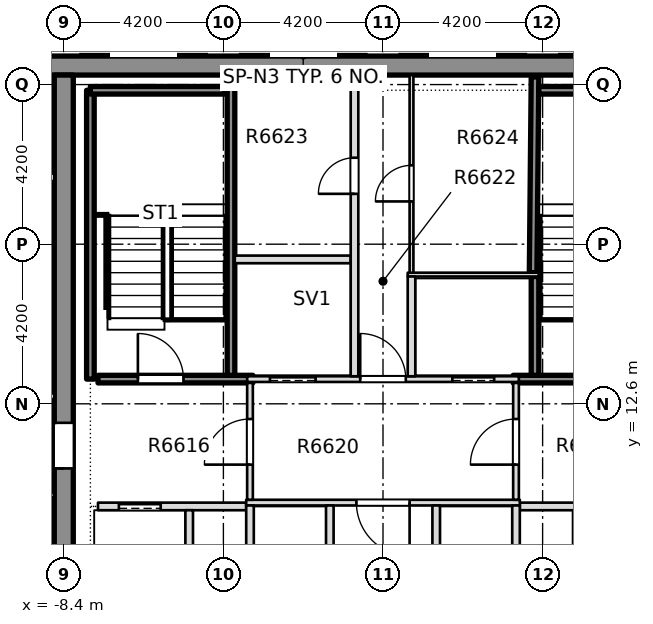
"""IFC4 building model, lengths in metres.
Left out: names, types, materials, properties, quantities, classifications, styles, units other than length and angle.
Written with IfcOpenShell. Run it as: python <this file> out.ifc"""

import sys

from ifc_helpers import new_model, si_unit, direction, frame, frame_2d, origin, place, context, subcontext, project, spatial, rectangle, extrude, element, fill, save


model = new_model("IFC4")
c1 = context("Model", 3, precision=1e-05, world=origin(), true_north=direction((0.0, 1.0)))
c2 = subcontext(c1, "Body", "Model", "MODEL_VIEW")
j1 = project(units=[si_unit("LENGTHUNIT", "METRE"), si_unit("PLANEANGLEUNIT", "RADIAN")], contexts=[c1])
p1 = place(None, origin())
s1 = spatial("IfcSite", under=j1, at=p1, CompositionType="ELEMENT")
p2 = place(p1, origin())
s2 = spatial("IfcBuilding", under=s1, at=p2, CompositionType="ELEMENT")
p3 = place(p2, frame((0.0, 0.0, 251.05)))
s3 = spatial("IfcBuildingStorey", under=s2, at=p3, CompositionType="ELEMENT", Elevation=251.05)
p4 = place(p3, frame((-12.1, 21.5, -0.4), z_axis=(0.0, 0.0, 1.0), x_axis=(1.0, 0.0, 0.0)))
e1 = element("IfcWall", 1, at=p4, inside=s3, PredefinedType="SHEAR", context=c2, shape_type="SweptSolid", body=[
    extrude(rectangle(XDim=24.2, YDim=0.5, at=frame_2d((12.1, 0.0))), origin(), (0.0, 0.0, 1.0), 3.45),
])
p5 = place(p3, frame((-8.4, -7.9, -0.4), z_axis=(0.0, 0.0, 1.0), x_axis=(0.0, 1.0, 0.0)))
e2 = element("IfcWall", 2, at=p5, inside=s3, PredefinedType="SHEAR", context=c2, shape_type="SweptSolid", body=[
    extrude(rectangle(XDim=29.15, YDim=0.5, at=frame_2d((14.575, 0.0))), origin(), (0.0, 0.0, 1.0), 3.45),
])
p6 = place(p5, frame((18.8, 0.0, 0.4)))
e3 = element("IfcOpeningElement", 3, at=p6, cuts=e2, PredefinedType="OPENING", context=c2, shape_type="SweptSolid", body=[
    extrude(rectangle(XDim=1.2, YDim=2.1, at=frame_2d((0.6, 1.05))), frame((0.0, 0.26, 0.0), z_axis=(0.0, -1.0, 0.0), x_axis=(1.0, 0.0, 0.0)), (0.0, 0.0, 1.0), 0.52),
])
p7 = place(p3, frame((-7.5, 9.9, 0.0), z_axis=(0.0, 0.0, 1.0), x_axis=(1.0, 0.0, 0.0)))
e4 = element("IfcWall", 4, at=p7, inside=s3, PredefinedType="PARTITIONING", context=c2, shape_type="SweptSolid", body=[
    extrude(rectangle(XDim=3.9, YDim=0.2, at=frame_2d((1.95, 0.0))), origin(), (0.0, 0.0, 1.0), 3.05),
])
p8 = place(p7, frame((0.55, 0.0, 0.0)))
e5 = element("IfcOpeningElement", 5, at=p8, cuts=e4, PredefinedType="OPENING", context=c2, shape_type="SweptSolid", body=[
    extrude(rectangle(XDim=1.1, YDim=2.1, at=frame_2d((0.55, 1.05))), frame((0.0, 0.11, 0.0), z_axis=(0.0, -1.0, 0.0), x_axis=(1.0, 0.0, 0.0)), (0.0, 0.0, 1.0), 0.22),
])
p9 = place(p3, frame((3.6, 9.9, 0.0), z_axis=(0.0, 0.0, 1.0), x_axis=(1.0, 0.0, 0.0)))
e6 = element("IfcWall", 6, at=p9, inside=s3, PredefinedType="PARTITIONING", context=c2, shape_type="SweptSolid", body=[
    extrude(rectangle(XDim=3.9, YDim=0.2, at=frame_2d((1.95, 0.0))), origin(), (0.0, 0.0, 1.0), 3.05),
])
p10 = place(p9, frame((2.25, 0.0, 0.0)))
e7 = element("IfcOpeningElement", 7, at=p10, cuts=e6, PredefinedType="OPENING", context=c2, shape_type="SweptSolid", body=[
    extrude(rectangle(XDim=1.1, YDim=2.1, at=frame_2d((0.55, 1.05))), frame((0.0, 0.11, 0.0), z_axis=(0.0, -1.0, 0.0), x_axis=(1.0, 0.0, 0.0)), (0.0, 0.0, 1.0), 0.22),
])
p11 = place(p3, frame((-3.6, 10.0, 0.0), z_axis=(0.0, 0.0, 1.0), x_axis=(1.0, 0.0, 0.0)))
e8 = element("IfcWall", 8, at=p11, inside=s3, PredefinedType="PARTITIONING", context=c2, shape_type="SweptSolid", body=[
    extrude(rectangle(XDim=7.2, YDim=0.15, at=frame_2d((3.6, 0.0))), origin(), (0.0, 0.0, 1.0), 3.05),
])
p12 = place(p11, frame((2.9, 0.0, 0.0)))
e9 = element("IfcOpeningElement", 9, at=p12, cuts=e8, PredefinedType="OPENING", context=c2, shape_type="SweptSolid", body=[
    extrude(rectangle(XDim=1.4, YDim=2.1, at=frame_2d((0.7, 1.05))), frame((0.0, 0.085, 0.0), z_axis=(0.0, -1.0, 0.0), x_axis=(1.0, 0.0, 0.0)), (0.0, 0.0, 1.0), 0.17),
])
p13 = place(p3, frame((-7.5, 13.25, 0.0), z_axis=(0.0, 0.0, 1.0), x_axis=(1.0, 0.0, 0.0)))
e10 = element("IfcWall", 10, at=p13, inside=s3, PredefinedType="SOLIDWALL", context=c2, shape_type="SweptSolid", body=[
    extrude(rectangle(XDim=4.075, YDim=0.2, at=frame_2d((2.038, 0.0))), origin(), (0.0, 0.0, 1.0), 3.05),
])
p14 = place(p13, frame((1.05, 0.0, 0.0)))
e11 = element("IfcOpeningElement", 11, at=p14, cuts=e10, PredefinedType="OPENING", context=c2, shape_type="SweptSolid", body=[
    extrude(rectangle(XDim=1.2, YDim=2.1, at=frame_2d((0.6, 1.05))), frame((0.0, 0.11, 0.0), z_axis=(0.0, -1.0, 0.0), x_axis=(1.0, 0.0, 0.0)), (0.0, 0.0, 1.0), 0.22),
])
p15 = place(p3, frame((-3.575, 13.25, 0.0), z_axis=(0.0, 0.0, 1.0), x_axis=(1.0, 0.0, 0.0)))
e12 = element("IfcWall", 12, at=p15, inside=s3, PredefinedType="PARTITIONING", context=c2, shape_type="SweptSolid", body=[
    extrude(rectangle(XDim=7.15, YDim=0.15, at=frame_2d((3.575, 0.0))), origin(), (0.0, 0.0, 1.0), 3.05),
])
p16 = place(p15, frame((0.6, 0.0, 0.0)))
e13 = element("IfcOpeningElement", 13, at=p16, cuts=e12, PredefinedType="OPENING", context=c2, shape_type="SweptSolid", body=[
    extrude(rectangle(XDim=1.2, YDim=2.1, at=frame_2d((0.6, 1.05))), frame((0.0, 0.085, 0.0), z_axis=(0.0, -1.0, 0.0), x_axis=(1.0, 0.0, 0.0)), (0.0, 0.0, 1.0), 0.17),
])
p17 = place(p15, frame((5.4, 0.0, 0.0)))
e14 = element("IfcOpeningElement", 14, at=p17, cuts=e12, PredefinedType="OPENING", context=c2, shape_type="SweptSolid", body=[
    extrude(rectangle(XDim=1.1, YDim=2.1, at=frame_2d((0.55, 1.05))), frame((0.0, 0.085, 0.0), z_axis=(0.0, -1.0, 0.0), x_axis=(1.0, 0.0, 0.0)), (0.0, 0.0, 1.0), 0.17),
])
p18 = place(p15, frame((2.975, 0.0, 0.0)))
e15 = element("IfcOpeningElement", 15, at=p18, cuts=e12, PredefinedType="OPENING", context=c2, shape_type="SweptSolid", body=[
    extrude(rectangle(XDim=1.2, YDim=2.1, at=frame_2d((0.6, 1.05))), frame((0.0, 0.085, 0.0), z_axis=(0.0, -1.0, 0.0), x_axis=(1.0, 0.0, 0.0)), (0.0, 0.0, 1.0), 0.17),
])
p19 = place(p3, frame((3.425, 13.25, 0.0), z_axis=(0.0, 0.0, 1.0), x_axis=(1.0, 0.0, 0.0)))
e16 = element("IfcWall", 16, at=p19, inside=s3, PredefinedType="SOLIDWALL", context=c2, shape_type="SweptSolid", body=[
    extrude(rectangle(XDim=4.075, YDim=0.2, at=frame_2d((2.038, 0.0))), origin(), (0.0, 0.0, 1.0), 3.05),
])
p20 = place(p19, frame((1.825, 0.0, 0.0)))
e17 = element("IfcOpeningElement", 17, at=p20, cuts=e16, PredefinedType="OPENING", context=c2, shape_type="SweptSolid", body=[
    extrude(rectangle(XDim=1.2, YDim=2.1, at=frame_2d((0.6, 1.05))), frame((0.0, 0.11, 0.0), z_axis=(0.0, -1.0, 0.0), x_axis=(1.0, 0.0, 0.0)), (0.0, 0.0, 1.0), 0.22),
])
p21 = place(p3, frame((0.65, 16.0, 0.0), z_axis=(0.0, 0.0, 1.0), x_axis=(1.0, 0.0, 0.0)))
e18 = element("IfcWall", 18, at=p21, inside=s3, PredefinedType="PARTITIONING", context=c2, shape_type="SweptSolid", body=[
    extrude(rectangle(XDim=3.45, YDim=0.1, at=frame_2d((1.725, 0.0))), origin(), (0.0, 0.0, 1.0), 3.05),
])
p22 = place(p3, frame((-3.9, 16.4, 0.0), z_axis=(0.0, 0.0, 1.0), x_axis=(1.0, 0.0, 0.0)))
e19 = element("IfcWall", 19, at=p22, inside=s3, PredefinedType="PARTITIONING", context=c2, shape_type="SweptSolid", body=[
    extrude(rectangle(XDim=3.05, YDim=0.2, at=frame_2d((1.525, 0.0))), origin(), (0.0, 0.0, 1.0), 3.05),
])
p23 = place(p3, frame((-5.1, 7.075, 0.0), z_axis=(0.0, 0.0, 1.0), x_axis=(0.0, 1.0, 0.0)))
e20 = element("IfcWall", 20, at=p23, inside=s3, PredefinedType="PARTITIONING", context=c2, shape_type="SweptSolid", body=[
    extrude(rectangle(XDim=2.725, YDim=0.2, at=frame_2d((1.363, 0.0))), origin(), (0.0, 0.0, 1.0), 3.05),
])
p24 = place(p3, frame((-4.0, 13.35, 0.0), z_axis=(0.0, 0.0, 1.0), x_axis=(0.0, 1.0, 0.0)))
e21 = element("IfcWall", 21, at=p24, inside=s3, PredefinedType="SOLIDWALL", context=c2, shape_type="SweptSolid", body=[
    extrude(rectangle(XDim=7.899, YDim=0.2, at=frame_2d((3.949, 0.0))), origin(), (0.0, 0.0, 1.0), 3.05),
])
p25 = place(p3, frame((-3.5, 7.075, 0.0), z_axis=(0.0, 0.0, 1.0), x_axis=(0.0, 1.0, 0.0)))
e22 = element("IfcWall", 22, at=p25, inside=s3, PredefinedType="PARTITIONING", context=c2, shape_type="SweptSolid", body=[
    extrude(rectangle(XDim=2.85, YDim=0.2, at=frame_2d((1.425, 0.0))), origin(), (0.0, 0.0, 1.0), 3.05),
])
p26 = place(p3, frame((-3.5, 10.075, 0.0), z_axis=(0.0, 0.0, 1.0), x_axis=(0.0, 1.0, 0.0)))
e23 = element("IfcWall", 23, at=p26, inside=s3, PredefinedType="PARTITIONING", context=c2, shape_type="SweptSolid", body=[
    extrude(rectangle(XDim=3.075, YDim=0.15, at=frame_2d((1.538, 0.0))), origin(), (0.0, 0.0, 1.0), 3.05),
])
p27 = place(p26, frame((0.925, 0.0, 0.0)))
e24 = element("IfcOpeningElement", 24, at=p27, cuts=e23, PredefinedType="OPENING", context=c2, shape_type="SweptSolid", body=[
    extrude(rectangle(XDim=1.2, YDim=2.1, at=frame_2d((0.6, 1.05))), frame((0.0, 0.085, 0.0), z_axis=(0.0, -1.0, 0.0), x_axis=(1.0, 0.0, 0.0)), (0.0, 0.0, 1.0), 0.17),
])
p28 = place(p3, frame((-1.4, 7.075, 0.0), z_axis=(0.0, 0.0, 1.0), x_axis=(0.0, 1.0, 0.0)))
e25 = element("IfcWall", 25, at=p28, inside=s3, PredefinedType="PARTITIONING", context=c2, shape_type="SweptSolid", body=[
    extrude(rectangle(XDim=2.85, YDim=0.2, at=frame_2d((1.425, 0.0))), origin(), (0.0, 0.0, 1.0), 3.05),
])
p29 = place(p3, frame((-0.75, 13.325, 0.0), z_axis=(0.0, 0.0, 1.0), x_axis=(0.0, 1.0, 0.0)))
e26 = element("IfcWall", 26, at=p29, inside=s3, PredefinedType="PARTITIONING", context=c2, shape_type="SweptSolid", body=[
    extrude(rectangle(XDim=7.924, YDim=0.2, at=frame_2d((3.962, 0.0))), origin(), (0.0, 0.0, 1.0), 3.05),
])
p30 = place(p29, frame((4.8, 0.0, 0.0)))
e27 = element("IfcOpeningElement", 27, at=p30, cuts=e26, PredefinedType="OPENING", context=c2, shape_type="SweptSolid", body=[
    extrude(rectangle(XDim=0.95, YDim=2.1, at=frame_2d((0.475, 1.05))), frame((0.0, 0.11, 0.0), z_axis=(0.0, -1.0, 0.0), x_axis=(1.0, 0.0, 0.0)), (0.0, 0.0, 1.0), 0.22),
])
p31 = place(p3, frame((0.75, 13.325, 0.0), z_axis=(0.0, 0.0, 1.0), x_axis=(0.0, 1.0, 0.0)))
e28 = element("IfcWall", 28, at=p31, inside=s3, PredefinedType="PARTITIONING", context=c2, shape_type="SweptSolid", body=[
    extrude(rectangle(XDim=2.625, YDim=0.2, at=frame_2d((1.312, 0.0))), origin(), (0.0, 0.0, 1.0), 3.05),
])
p32 = place(p3, frame((0.75, 16.05, 0.0), z_axis=(0.0, 0.0, 1.0), x_axis=(0.0, 1.0, 0.0)))
e29 = element("IfcWall", 29, at=p32, inside=s3, PredefinedType="PARTITIONING", context=c2, shape_type="SweptSolid", body=[
    extrude(rectangle(XDim=5.199, YDim=0.1, at=frame_2d((2.6, 0.0))), origin(), (0.0, 0.0, 1.0), 3.05),
])
p33 = place(p32, frame((1.875, 0.0, 0.0)))
e30 = element("IfcOpeningElement", 30, at=p33, cuts=e29, PredefinedType="OPENING", context=c2, shape_type="SweptSolid", body=[
    extrude(rectangle(XDim=0.95, YDim=2.1, at=frame_2d((0.475, 1.05))), frame((0.0, 0.06, 0.0), z_axis=(0.0, -1.0, 0.0), x_axis=(1.0, 0.0, 0.0)), (0.0, 0.0, 1.0), 0.12),
])
for number, where, z_axis, x_axis in (
    (31, (1.4, 7.075, 0.0), (0.0, 0.0, 1.0), (0.0, 1.0, 0.0)),
    (32, (3.5, 7.075, 0.0), (0.0, 0.0, 1.0), (0.0, 1.0, 0.0)),
):
    element("IfcWall", number, at=place(p3, frame(where, z_axis=z_axis, x_axis=x_axis)), inside=s3, PredefinedType="PARTITIONING", context=c2, shape_type="SweptSolid", body=[
        extrude(rectangle(XDim=2.85, YDim=0.2, at=frame_2d((1.425, 0.0))), origin(), (0.0, 0.0, 1.0), 3.05),
    ])
p34 = place(p3, frame((3.5, 10.075, 0.0), z_axis=(0.0, 0.0, 1.0), x_axis=(0.0, 1.0, 0.0)))
e33 = element("IfcWall", 33, at=p34, inside=s3, PredefinedType="PARTITIONING", context=c2, shape_type="SweptSolid", body=[
    extrude(rectangle(XDim=3.075, YDim=0.15, at=frame_2d((1.538, 0.0))), origin(), (0.0, 0.0, 1.0), 3.05),
])
p35 = place(p34, frame((0.925, 0.0, 0.0)))
e34 = element("IfcOpeningElement", 34, at=p35, cuts=e33, PredefinedType="OPENING", context=c2, shape_type="SweptSolid", body=[
    extrude(rectangle(XDim=1.2, YDim=2.1, at=frame_2d((0.6, 1.05))), frame((0.0, 0.085, 0.0), z_axis=(0.0, -1.0, 0.0), x_axis=(1.0, 0.0, 0.0)), (0.0, 0.0, 1.0), 0.17),
])
p36 = place(p3, frame((4.0, 13.35, 0.0), z_axis=(0.0, 0.0, 1.0), x_axis=(0.0, 1.0, 0.0)))
e35 = element("IfcWall", 35, at=p36, inside=s3, PredefinedType="SOLIDWALL", context=c2, shape_type="SweptSolid", body=[
    extrude(rectangle(XDim=2.6, YDim=0.2, at=frame_2d((1.3, 0.0))), origin(), (0.0, 0.0, 1.0), 3.05),
])
p37 = place(p3, frame((3.95, 16.05, 0.0), z_axis=(0.0, 0.0, 1.0), x_axis=(0.009719787395, 0.999952761751, 0.0)))
e36 = element("IfcWall", 36, at=p37, inside=s3, PredefinedType="SOLIDWALL", context=c2, shape_type="SweptSolid", body=[
    extrude(rectangle(XDim=5.149, YDim=0.2, at=frame_2d((2.575, 0.0))), origin(), (0.0, 0.0, 1.0), 3.05),
])
p38 = place(p3, frame((-12.099, 10.2, 0.0), z_axis=(0.0, 0.0, 1.0), x_axis=(1.0, 0.0, 0.0)))
e37 = element("IfcWall", 37, at=p38, inside=s3, PredefinedType="PARTITIONING", context=c2, shape_type="SweptSolid", body=[
    extrude(rectangle(XDim=3.448, YDim=0.1, at=frame_2d((1.724, 0.0))), origin(), (0.0, 0.0, 1.0), 3.05),
])
p39 = place(p3, frame((-12.099, 12.8, 0.0), z_axis=(0.0, 0.0, 1.0), x_axis=(1.0, 0.0, 0.0)))
e38 = element("IfcWall", 38, at=p39, inside=s3, PredefinedType="PARTITIONING", context=c2, shape_type="SweptSolid", body=[
    extrude(rectangle(XDim=3.448, YDim=0.15, at=frame_2d((1.724, 0.0))), origin(), (0.0, 0.0, 1.0), 3.05),
])
p40 = place(p3, frame((-12.099, 18.56, 0.0), z_axis=(0.0, 0.0, 1.0), x_axis=(1.0, 0.0, 0.0)))
e39 = element("IfcWall", 39, at=p40, inside=s3, PredefinedType="PARTITIONING", context=c2, shape_type="SweptSolid", body=[
    extrude(rectangle(XDim=3.448, YDim=0.2, at=frame_2d((1.724, 0.0))), origin(), (0.0, 0.0, 1.0), 3.05),
])
p41 = place(p3, frame((-7.7, 13.25, 0.0), z_axis=(0.0, 0.0, 1.0), x_axis=(0.0, 1.0, 0.0)))
e40 = element("IfcWall", 40, at=p41, inside=s3, PredefinedType="SOLIDWALL", context=c2, shape_type="SweptSolid", body=[
    extrude(rectangle(XDim=7.6, YDim=0.2, at=frame_2d((3.8, 0.0))), origin(), (0.0, 0.0, 1.0), 3.05),
])
p42 = place(p3, frame((-7.7, 20.85, 0.0), z_axis=(0.0, 0.0, 1.0), x_axis=(1.0, 0.0, 0.0)))
e41 = element("IfcWall", 41, at=p42, inside=s3, PredefinedType="SOLIDWALL", context=c2, shape_type="SweptSolid", body=[
    extrude(rectangle(XDim=3.55, YDim=0.2, at=frame_2d((1.775, 0.0))), origin(), (0.0, 0.0, 1.0), 3.05),
])
p43 = place(p3, frame((4.1, 20.85, 0.0), z_axis=(0.0, 0.0, 1.0), x_axis=(1.0, 0.0, 0.0)))
e42 = element("IfcWall", 42, at=p43, inside=s3, PredefinedType="SOLIDWALL", context=c2, shape_type="SweptSolid", body=[
    extrude(rectangle(XDim=3.6, YDim=0.2, at=frame_2d((1.8, 0.0))), origin(), (0.0, 0.0, 1.0), 3.05),
])
p44 = place(p14, origin())
e43 = element("IfcDoor", 43, at=p44, inside=s3, OperationType="SINGLE_SWING_LEFT", PredefinedType="DOOR", context=c2, shape_type="SweptSolid", body=[
    extrude(rectangle(XDim=1.2, YDim=2.1, at=frame_2d((0.6, 1.05))), frame((0.0, 0.025, 0.0), z_axis=(0.0, -1.0, 0.0), x_axis=(1.0, 0.0, 0.0)), (0.0, 0.0, 1.0), 0.05),
])
fill(e11, e43)
p45 = place(p8, origin())
e44 = element("IfcDoor", 44, at=p45, inside=s3, OperationType="SLIDING_TO_RIGHT", PredefinedType="DOOR", context=c2, shape_type="SweptSolid", body=[
    extrude(rectangle(XDim=1.1, YDim=2.1, at=frame_2d((0.55, 1.05))), frame((0.0, 0.025, 0.0), z_axis=(0.0, -1.0, 0.0), x_axis=(1.0, 0.0, 0.0)), (0.0, 0.0, 1.0), 0.05),
])
fill(e5, e44)
p46 = place(p12, origin())
e45 = element("IfcDoor", 45, at=p46, inside=s3, OperationType="SINGLE_SWING_RIGHT", PredefinedType="DOOR", context=c2, shape_type="SweptSolid", body=[
    extrude(rectangle(XDim=1.4, YDim=2.1, at=frame_2d((0.7, 1.05))), frame((0.0, 0.025, 0.0), z_axis=(0.0, -1.0, 0.0), x_axis=(1.0, 0.0, 0.0)), (0.0, 0.0, 1.0), 0.05),
])
fill(e9, e45)
p47 = place(p16, origin())
e46 = element("IfcDoor", 46, at=p47, inside=s3, OperationType="SLIDING_TO_RIGHT", PredefinedType="DOOR", context=c2, shape_type="SweptSolid", body=[
    extrude(rectangle(XDim=1.2, YDim=2.1, at=frame_2d((0.6, 1.05))), frame((0.0, 0.025, 0.0), z_axis=(0.0, -1.0, 0.0), x_axis=(1.0, 0.0, 0.0)), (0.0, 0.0, 1.0), 0.05),
])
fill(e13, e46)
p48 = place(p17, origin())
e47 = element("IfcDoor", 47, at=p48, inside=s3, OperationType="SLIDING_TO_LEFT", PredefinedType="DOOR", context=c2, shape_type="SweptSolid", body=[
    extrude(rectangle(XDim=1.1, YDim=2.1, at=frame_2d((0.55, 1.05))), frame((0.0, 0.025, 0.0), z_axis=(0.0, -1.0, 0.0), x_axis=(1.0, 0.0, 0.0)), (0.0, 0.0, 1.0), 0.05),
])
fill(e14, e47)
p49 = place(p18, origin())
e48 = element("IfcDoor", 48, at=p49, inside=s3, OperationType="SINGLE_SWING_RIGHT", PredefinedType="DOOR", context=c2, shape_type="SweptSolid", body=[
    extrude(rectangle(XDim=1.2, YDim=2.1, at=frame_2d((0.6, 1.05))), frame((0.0, 0.025, 0.0), z_axis=(0.0, -1.0, 0.0), x_axis=(1.0, 0.0, 0.0)), (0.0, 0.0, 1.0), 0.05),
])
fill(e15, e48)
p50 = place(p30, origin())
e49 = element("IfcDoor", 49, at=p50, inside=s3, OperationType="SINGLE_SWING_RIGHT", PredefinedType="DOOR", context=c2, shape_type="SweptSolid", body=[
    extrude(rectangle(XDim=0.95, YDim=2.1, at=frame_2d((0.475, 1.05))), frame((0.0, 0.025, 0.0), z_axis=(0.0, -1.0, 0.0), x_axis=(1.0, 0.0, 0.0)), (0.0, 0.0, 1.0), 0.05),
])
fill(e27, e49)
p51 = place(p33, origin())
e50 = element("IfcDoor", 50, at=p51, inside=s3, OperationType="SINGLE_SWING_LEFT", PredefinedType="DOOR", context=c2, shape_type="SweptSolid", body=[
    extrude(rectangle(XDim=0.95, YDim=2.1, at=frame_2d((0.475, 1.05))), frame((0.0, 0.025, 0.0), z_axis=(0.0, -1.0, 0.0), x_axis=(1.0, 0.0, 0.0)), (0.0, 0.0, 1.0), 0.05),
])
fill(e30, e50)
p52 = place(p27, origin())
e51 = element("IfcDoor", 51, at=p52, inside=s3, OperationType="SINGLE_SWING_RIGHT", PredefinedType="DOOR", context=c2, shape_type="SweptSolid", body=[
    extrude(rectangle(XDim=1.2, YDim=2.1, at=frame_2d((0.6, 1.05))), frame((0.0, 0.025, 0.0), z_axis=(0.0, -1.0, 0.0), x_axis=(1.0, 0.0, 0.0)), (0.0, 0.0, 1.0), 0.05),
])
fill(e24, e51)
p53 = place(p35, origin())
e52 = element("IfcDoor", 52, at=p53, inside=s3, OperationType="SINGLE_SWING_LEFT", PredefinedType="DOOR", context=c2, shape_type="SweptSolid", body=[
    extrude(rectangle(XDim=1.2, YDim=2.1, at=frame_2d((0.6, 1.05))), frame((0.0, 0.025, 0.0), z_axis=(0.0, -1.0, 0.0), x_axis=(1.0, 0.0, 0.0)), (0.0, 0.0, 1.0), 0.05),
])
fill(e34, e52)
p54 = place(p6, origin())
e53 = element("IfcDoor", 53, at=p54, inside=s3, OperationType="SINGLE_SWING_LEFT", PredefinedType="DOOR", context=c2, shape_type="SweptSolid", body=[
    extrude(rectangle(XDim=1.2, YDim=2.1, at=frame_2d((0.6, 1.05))), frame((0.0, 0.025, 0.0), z_axis=(0.0, -1.0, 0.0), x_axis=(1.0, 0.0, 0.0)), (0.0, 0.0, 1.0), 0.05),
])
fill(e3, e53)
save(model, sys.argv[1])
